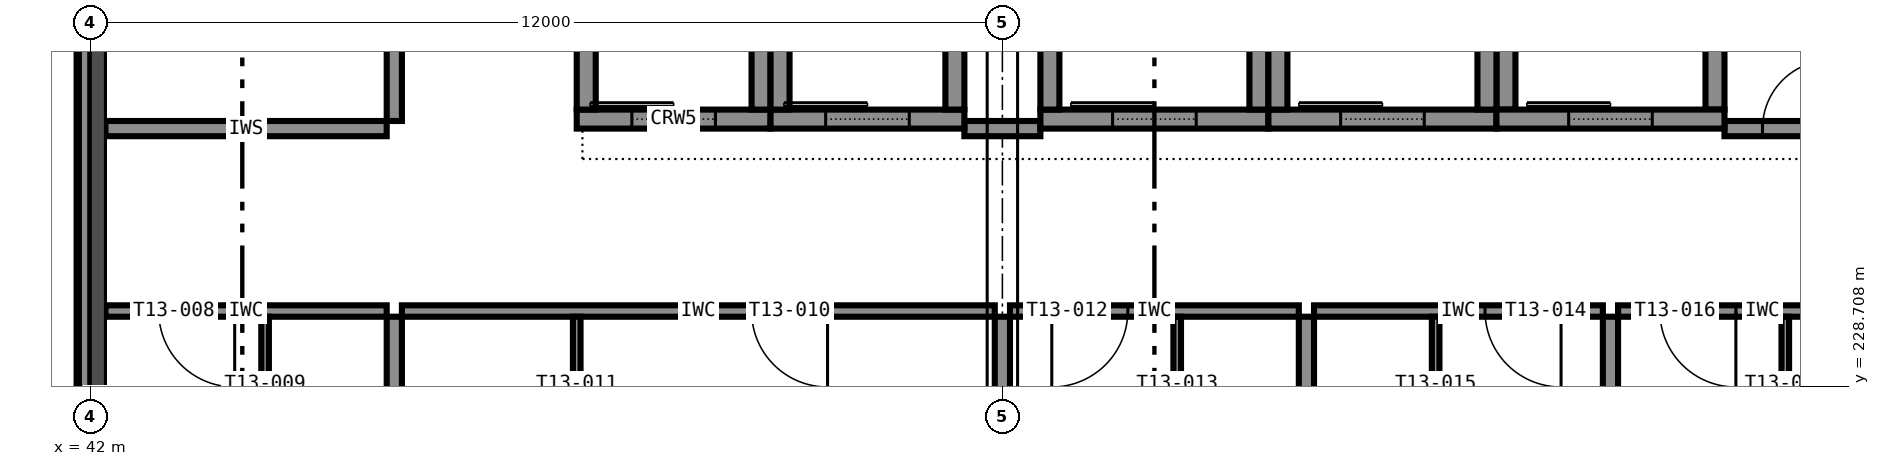
"""IFC4 building model, lengths in metres.
Left out: names, types, materials, properties, quantities, classifications, styles, units other than length and angle.
Written with IfcOpenShell. Run it as: python <this file> out.ifc"""

import sys

from ifc_helpers import new_model, si_unit, direction, frame, frame_2d, origin, place, context, subcontext, project, spatial, rectangle, extrude, element, fill, save


model = new_model("IFC4")
c1 = context("Model", 3, precision=1e-05, world=origin(), true_north=direction((0.0, 1.0)))
c2 = subcontext(c1, "Body", "Model", "MODEL_VIEW")
j1 = project(units=[si_unit("LENGTHUNIT", "METRE"), si_unit("PLANEANGLEUNIT", "RADIAN")], contexts=[c1])
p1 = place(None, origin())
s1 = spatial("IfcSite", under=j1, at=p1, CompositionType="ELEMENT")
p2 = place(p1, origin())
s2 = spatial("IfcBuilding", under=s1, at=p2, CompositionType="ELEMENT")
p3 = place(p2, frame((0.0, 0.0, 53.4)))
s3 = spatial("IfcBuildingStorey", under=s2, at=p3, CompositionType="ELEMENT", Elevation=53.4)
p4 = place(p3, frame((54.5, 232.225, 0.0), z_axis=(0.0, 0.0, 1.0), x_axis=(1.0, 0.0, 0.0)))
e1 = element("IfcWall", 1, at=p4, inside=s3, PredefinedType="SHEAR", context=c2, shape_type="SweptSolid", body=[
    extrude(rectangle(XDim=3.0, YDim=0.25, at=frame_2d((1.5, 0.0))), origin(), (0.0, 0.0, 1.0), 3.6),
])
p5 = place(p4, frame((0.95, 0.0, 0.0)))
e2 = element("IfcOpeningElement", 2, at=p5, cuts=e1, PredefinedType="OPENING", context=c2, shape_type="SweptSolid", body=[
    extrude(rectangle(XDim=1.1, YDim=2.1, at=frame_2d((0.55, 1.05))), frame((0.0, 0.135, 0.0), z_axis=(0.0, -1.0, 0.0), x_axis=(1.0, 0.0, 0.0)), (0.0, 0.0, 1.0), 0.27),
])
for number, where, z_axis, x_axis in (
    (3, (54.625, 232.35, 0.0), (0.0, 0.0, 1.0), (0.0, 1.0, 0.0)),
    (4, (57.375, 232.35, 0.0), (0.0, 0.0, 1.0), (0.0, 1.0, 0.0)),
):
    element("IfcWall", number, at=place(p3, frame(where, z_axis=z_axis, x_axis=x_axis)), inside=s3, PredefinedType="SHEAR", context=c2, shape_type="SweptSolid", body=[
        extrude(rectangle(XDim=3.3, YDim=0.25, at=frame_2d((1.65, 0.0))), origin(), (0.0, 0.0, 1.0), 3.6),
    ])
p6 = place(p3, frame((57.5, 232.225, 0.0), z_axis=(0.0, 0.0, 1.0), x_axis=(1.0, 0.0, 0.0)))
e5 = element("IfcWall", 5, at=p6, inside=s3, PredefinedType="SHEAR", context=c2, shape_type="SweptSolid", body=[
    extrude(rectangle(XDim=3.0, YDim=0.25, at=frame_2d((1.5, 0.0))), origin(), (0.0, 0.0, 1.0), 3.6),
])
p7 = place(p6, frame((0.95, 0.0, 0.0)))
e6 = element("IfcOpeningElement", 6, at=p7, cuts=e5, PredefinedType="OPENING", context=c2, shape_type="SweptSolid", body=[
    extrude(rectangle(XDim=1.1, YDim=2.1, at=frame_2d((0.55, 1.05))), frame((0.0, 0.135, 0.0), z_axis=(0.0, -1.0, 0.0), x_axis=(1.0, 0.0, 0.0)), (0.0, 0.0, 1.0), 0.27),
])
for number, where, z_axis, x_axis in (
    (7, (57.625, 232.35, 0.0), (0.0, 0.0, 1.0), (0.0, 1.0, 0.0)),
    (8, (60.375, 232.35, 0.0), (0.0, 0.0, 1.0), (0.0, 1.0, 0.0)),
):
    element("IfcWall", number, at=place(p3, frame(where, z_axis=z_axis, x_axis=x_axis)), inside=s3, PredefinedType="SHEAR", context=c2, shape_type="SweptSolid", body=[
        extrude(rectangle(XDim=3.3, YDim=0.25, at=frame_2d((1.65, 0.0))), origin(), (0.0, 0.0, 1.0), 3.6),
    ])
p8 = place(p3, frame((60.5, 232.225, 0.0), z_axis=(0.0, 0.0, 1.0), x_axis=(1.0, 0.0, 0.0)))
e9 = element("IfcWall", 9, at=p8, inside=s3, PredefinedType="SHEAR", context=c2, shape_type="SweptSolid", body=[
    extrude(rectangle(XDim=3.0, YDim=0.25, at=frame_2d((1.5, 0.0))), origin(), (0.0, 0.0, 1.0), 3.6),
])
p9 = place(p8, frame((0.95, 0.0, 0.0)))
e10 = element("IfcOpeningElement", 10, at=p9, cuts=e9, PredefinedType="OPENING", context=c2, shape_type="SweptSolid", body=[
    extrude(rectangle(XDim=1.1, YDim=2.1, at=frame_2d((0.55, 1.05))), frame((0.0, 0.135, 0.0), z_axis=(0.0, -1.0, 0.0), x_axis=(1.0, 0.0, 0.0)), (0.0, 0.0, 1.0), 0.27),
])
for number, where, z_axis, x_axis in (
    (11, (60.625, 232.35, 0.0), (0.0, 0.0, 1.0), (0.0, 1.0, 0.0)),
    (12, (63.375, 232.35, 0.0), (0.0, 0.0, 1.0), (0.0, 1.0, 0.0)),
):
    element("IfcWall", number, at=place(p3, frame(where, z_axis=z_axis, x_axis=x_axis)), inside=s3, PredefinedType="SHEAR", context=c2, shape_type="SweptSolid", body=[
        extrude(rectangle(XDim=3.3, YDim=0.25, at=frame_2d((1.65, 0.0))), origin(), (0.0, 0.0, 1.0), 3.6),
    ])
p10 = place(p3, frame((48.4, 232.225, 0.0), z_axis=(0.0, 0.0, 1.0), x_axis=(1.0, 0.0, 0.0)))
e13 = element("IfcWall", 13, at=p10, inside=s3, PredefinedType="SHEAR", context=c2, shape_type="SweptSolid", body=[
    extrude(rectangle(XDim=2.55, YDim=0.25, at=frame_2d((1.275, 0.0))), origin(), (0.0, 0.0, 1.0), 3.6),
])
p11 = place(p10, frame((0.725, 0.0, 0.0)))
e14 = element("IfcOpeningElement", 14, at=p11, cuts=e13, PredefinedType="OPENING", context=c2, shape_type="SweptSolid", body=[
    extrude(rectangle(XDim=1.1, YDim=2.1, at=frame_2d((0.55, 1.05))), frame((0.0, 0.135, 0.0), z_axis=(0.0, -1.0, 0.0), x_axis=(1.0, 0.0, 0.0)), (0.0, 0.0, 1.0), 0.27),
])
for number, where, z_axis, x_axis in (
    (15, (48.525, 232.35, 0.0), (0.0, 0.0, 1.0), (0.0, 1.0, 0.0)),
    (16, (50.825, 232.35, 0.0), (0.0, 0.0, 1.0), (0.0, 1.0, 0.0)),
):
    element("IfcWall", number, at=place(p3, frame(where, z_axis=z_axis, x_axis=x_axis)), inside=s3, PredefinedType="SHEAR", context=c2, shape_type="SweptSolid", body=[
        extrude(rectangle(XDim=3.3, YDim=0.25, at=frame_2d((1.65, 0.0))), origin(), (0.0, 0.0, 1.0), 3.6),
    ])
p12 = place(p3, frame((50.95, 232.225, 0.0), z_axis=(0.0, 0.0, 1.0), x_axis=(1.0, 0.0, 0.0)))
e17 = element("IfcWall", 17, at=p12, inside=s3, PredefinedType="SHEAR", context=c2, shape_type="SweptSolid", body=[
    extrude(rectangle(XDim=2.55, YDim=0.25, at=frame_2d((1.275, 0.0))), origin(), (0.0, 0.0, 1.0), 3.6),
])
p13 = place(p12, frame((0.725, 0.0, 0.0)))
e18 = element("IfcOpeningElement", 18, at=p13, cuts=e17, PredefinedType="OPENING", context=c2, shape_type="SweptSolid", body=[
    extrude(rectangle(XDim=1.1, YDim=2.1, at=frame_2d((0.55, 1.05))), frame((0.0, 0.135, 0.0), z_axis=(0.0, -1.0, 0.0), x_axis=(1.0, 0.0, 0.0)), (0.0, 0.0, 1.0), 0.27),
])
for number, where, z_axis, x_axis in (
    (19, (51.075, 232.35, 0.0), (0.0, 0.0, 1.0), (0.0, 1.0, 0.0)),
    (20, (53.375, 232.35, 0.0), (0.0, 0.0, 1.0), (0.0, 1.0, 0.0)),
):
    element("IfcWall", number, at=place(p3, frame(where, z_axis=z_axis, x_axis=x_axis)), inside=s3, PredefinedType="SHEAR", context=c2, shape_type="SweptSolid", body=[
        extrude(rectangle(XDim=3.3, YDim=0.25, at=frame_2d((1.65, 0.0))), origin(), (0.0, 0.0, 1.0), 3.6),
    ])
p14 = place(p3, frame((41.925, 233.65, 3.4), z_axis=(0.0, 0.0, 1.0), x_axis=(0.0, -1.0, 0.0)))
e21 = element("IfcWall", 21, at=p14, inside=s3, PredefinedType="STANDARD", context=c2, shape_type="SweptSolid", body=[
    extrude(rectangle(XDim=11.3, YDim=0.15, at=frame_2d((5.65, 0.0))), origin(), (0.0, 0.0, 1.0), 0.2),
])
p15 = place(p3, frame((42.2, 232.1, 0.0), z_axis=(0.0, 0.0, 1.0), x_axis=(1.0, 0.0, 0.0)))
e22 = element("IfcWall", 22, at=p15, inside=s3, PredefinedType="PARTITIONING", context=c2, shape_type="SweptSolid", body=[
    extrude(rectangle(XDim=3.7, YDim=0.2, at=frame_2d((1.85, 0.0))), origin(), (0.0, 0.0, 1.0), 3.4),
])
p16 = place(p3, frame((53.5, 232.1, 0.0), z_axis=(0.0, 0.0, 1.0), x_axis=(1.0, 0.0, 0.0)))
e23 = element("IfcWall", 23, at=p16, inside=s3, PredefinedType="PARTITIONING", context=c2, shape_type="SweptSolid", body=[
    extrude(rectangle(XDim=1.0, YDim=0.2, at=frame_2d((0.5, 0.0))), origin(), (0.0, 0.0, 1.0), 3.4),
])
p17 = place(p3, frame((63.5, 232.1, 0.0), z_axis=(0.0, 0.0, 1.0), x_axis=(1.0, 0.0, 0.0)))
e24 = element("IfcWall", 24, at=p17, inside=s3, PredefinedType="PARTITIONING", context=c2, shape_type="SweptSolid", body=[
    extrude(rectangle(XDim=1.9, YDim=0.2, at=frame_2d((0.95, 0.0))), origin(), (0.0, 0.0, 1.0), 3.4),
])
p18 = place(p17, frame((0.5, 0.0, 0.0)))
e25 = element("IfcOpeningElement", 25, at=p18, cuts=e24, PredefinedType="OPENING", context=c2, shape_type="SweptSolid", body=[
    extrude(rectangle(XDim=0.9, YDim=2.1, at=frame_2d((0.45, 1.05))), frame((0.0, 0.11, 0.0), z_axis=(0.0, -1.0, 0.0), x_axis=(1.0, 0.0, 0.0)), (0.0, 0.0, 1.0), 0.22),
])
p19 = place(p3, frame((46.0, 232.2, 0.0), z_axis=(0.0, 0.0, 1.0), x_axis=(0.0, 1.0, 0.0)))
e26 = element("IfcWall", 26, at=p19, inside=s3, PredefinedType="PARTITIONING", context=c2, shape_type="SweptSolid", body=[
    extrude(rectangle(XDim=3.6, YDim=0.2, at=frame_2d((1.8, 0.0))), origin(), (0.0, 0.0, 1.0), 3.4),
])
p20 = place(p19, frame((1.35, 0.0, 0.0)))
e27 = element("IfcOpeningElement", 27, at=p20, cuts=e26, PredefinedType="OPENING", context=c2, shape_type="SweptSolid", body=[
    extrude(rectangle(XDim=0.9, YDim=2.1, at=frame_2d((0.45, 1.05))), frame((0.0, 0.11, 0.0), z_axis=(0.0, -1.0, 0.0), x_axis=(1.0, 0.0, 0.0)), (0.0, 0.0, 1.0), 0.22),
])
p21 = place(p3, frame((45.9, 229.7, 0.0), z_axis=(0.0, 0.0, 1.0), x_axis=(-1.0, 0.0, 0.0)))
e28 = element("IfcWall", 28, at=p21, inside=s3, PredefinedType="PARTITIONING", context=c2, shape_type="SweptSolid", body=[
    extrude(rectangle(XDim=3.7, YDim=0.15, at=frame_2d((1.85, 0.0))), origin(), (0.0, 0.0, 1.0), 3.4),
])
p22 = place(p21, frame((2.0, 0.0, 0.0)))
e29 = element("IfcOpeningElement", 29, at=p22, cuts=e28, PredefinedType="OPENING", context=c2, shape_type="SweptSolid", body=[
    extrude(rectangle(XDim=1.0, YDim=2.1, at=frame_2d((0.5, 1.05))), frame((0.0, 0.085, 0.0), z_axis=(0.0, -1.0, 0.0), x_axis=(1.0, 0.0, 0.0)), (0.0, 0.0, 1.0), 0.17),
])
p23 = place(p3, frame((44.3, 226.75, 0.0), z_axis=(0.0, 0.0, 1.0), x_axis=(0.0, 1.0, 0.0)))
e30 = element("IfcWall", 30, at=p23, inside=s3, PredefinedType="PARTITIONING", context=c2, shape_type="SweptSolid", body=[
    extrude(rectangle(XDim=2.875, YDim=0.1, at=frame_2d((1.438, 0.0))), origin(), (0.0, 0.0, 1.0), 3.4),
])
p24 = place(p23, frame((1.038, 0.0, 0.0)))
e31 = element("IfcOpeningElement", 31, at=p24, cuts=e30, PredefinedType="OPENING", context=c2, shape_type="SweptSolid", body=[
    extrude(rectangle(XDim=0.8, YDim=2.1, at=frame_2d((0.4, 1.05))), frame((0.0, 0.06, 0.0), z_axis=(0.0, -1.0, 0.0), x_axis=(1.0, 0.0, 0.0)), (0.0, 0.0, 1.0), 0.12),
])
p25 = place(p3, frame((53.9, 229.7, 0.0), z_axis=(0.0, 0.0, 1.0), x_axis=(-1.0, 0.0, 0.0)))
e32 = element("IfcWall", 32, at=p25, inside=s3, PredefinedType="PARTITIONING", context=c2, shape_type="SweptSolid", body=[
    extrude(rectangle(XDim=7.8, YDim=0.15, at=frame_2d((3.9, 0.0))), origin(), (0.0, 0.0, 1.0), 3.4),
])
p26 = place(p25, frame((2.2, 0.0, 0.0)))
e33 = element("IfcOpeningElement", 33, at=p26, cuts=e32, PredefinedType="OPENING", context=c2, shape_type="SweptSolid", body=[
    extrude(rectangle(XDim=1.0, YDim=2.1, at=frame_2d((0.5, 1.05))), frame((0.0, 0.085, 0.0), z_axis=(0.0, -1.0, 0.0), x_axis=(1.0, 0.0, 0.0)), (0.0, 0.0, 1.0), 0.17),
])
p27 = place(p3, frame((48.4, 229.625, 0.0), z_axis=(0.0, 0.0, 1.0), x_axis=(0.0, -1.0, 0.0)))
e34 = element("IfcWall", 34, at=p27, inside=s3, PredefinedType="PARTITIONING", context=c2, shape_type="SweptSolid", body=[
    extrude(rectangle(XDim=2.875, YDim=0.1, at=frame_2d((1.438, 0.0))), origin(), (0.0, 0.0, 1.0), 3.4),
])
p28 = place(p27, frame((1.038, 0.0, 0.0)))
e35 = element("IfcOpeningElement", 35, at=p28, cuts=e34, PredefinedType="OPENING", context=c2, shape_type="SweptSolid", body=[
    extrude(rectangle(XDim=0.8, YDim=2.1, at=frame_2d((0.4, 1.05))), frame((0.0, 0.06, 0.0), z_axis=(0.0, -1.0, 0.0), x_axis=(1.0, 0.0, 0.0)), (0.0, 0.0, 1.0), 0.12),
])
p29 = place(p3, frame((57.9, 229.7, 0.0), z_axis=(0.0, 0.0, 1.0), x_axis=(-1.0, 0.0, 0.0)))
e36 = element("IfcWall", 36, at=p29, inside=s3, PredefinedType="PARTITIONING", context=c2, shape_type="SweptSolid", body=[
    extrude(rectangle(XDim=3.8, YDim=0.15, at=frame_2d((1.9, 0.0))), origin(), (0.0, 0.0, 1.0), 3.4),
])
p30 = place(p29, frame((2.25, 0.0, 0.0)))
e37 = element("IfcOpeningElement", 37, at=p30, cuts=e36, PredefinedType="OPENING", context=c2, shape_type="SweptSolid", body=[
    extrude(rectangle(XDim=1.0, YDim=2.1, at=frame_2d((0.5, 1.05))), frame((0.0, 0.085, 0.0), z_axis=(0.0, -1.0, 0.0), x_axis=(1.0, 0.0, 0.0)), (0.0, 0.0, 1.0), 0.17),
])
p31 = place(p3, frame((56.3, 226.75, 0.0), z_axis=(0.0, 0.0, 1.0), x_axis=(0.0, 1.0, 0.0)))
e38 = element("IfcWall", 38, at=p31, inside=s3, PredefinedType="PARTITIONING", context=c2, shape_type="SweptSolid", body=[
    extrude(rectangle(XDim=2.875, YDim=0.1, at=frame_2d((1.438, 0.0))), origin(), (0.0, 0.0, 1.0), 3.4),
])
p32 = place(p31, frame((1.038, 0.0, 0.0)))
e39 = element("IfcOpeningElement", 39, at=p32, cuts=e38, PredefinedType="OPENING", context=c2, shape_type="SweptSolid", body=[
    extrude(rectangle(XDim=0.8, YDim=2.1, at=frame_2d((0.4, 1.05))), frame((0.0, 0.06, 0.0), z_axis=(0.0, -1.0, 0.0), x_axis=(1.0, 0.0, 0.0)), (0.0, 0.0, 1.0), 0.12),
])
p33 = place(p3, frame((61.9, 229.7, 0.0), z_axis=(0.0, 0.0, 1.0), x_axis=(-1.0, 0.0, 0.0)))
e40 = element("IfcWall", 40, at=p33, inside=s3, PredefinedType="PARTITIONING", context=c2, shape_type="SweptSolid", body=[
    extrude(rectangle(XDim=3.8, YDim=0.15, at=frame_2d((1.9, 0.0))), origin(), (0.0, 0.0, 1.0), 3.4),
])
p34 = place(p33, frame((0.55, 0.0, 0.0)))
e41 = element("IfcOpeningElement", 41, at=p34, cuts=e40, PredefinedType="OPENING", context=c2, shape_type="SweptSolid", body=[
    extrude(rectangle(XDim=1.0, YDim=2.1, at=frame_2d((0.5, 1.05))), frame((0.0, 0.085, 0.0), z_axis=(0.0, -1.0, 0.0), x_axis=(1.0, 0.0, 0.0)), (0.0, 0.0, 1.0), 0.17),
])
p35 = place(p3, frame((59.7, 229.625, 0.0), z_axis=(0.0, 0.0, 1.0), x_axis=(0.0, -1.0, 0.0)))
e42 = element("IfcWall", 42, at=p35, inside=s3, PredefinedType="PARTITIONING", context=c2, shape_type="SweptSolid", body=[
    extrude(rectangle(XDim=2.875, YDim=0.1, at=frame_2d((1.438, 0.0))), origin(), (0.0, 0.0, 1.0), 3.4),
])
p36 = place(p35, frame((1.038, 0.0, 0.0)))
e43 = element("IfcOpeningElement", 43, at=p36, cuts=e42, PredefinedType="OPENING", context=c2, shape_type="SweptSolid", body=[
    extrude(rectangle(XDim=0.8, YDim=2.1, at=frame_2d((0.4, 1.05))), frame((0.0, 0.06, 0.0), z_axis=(0.0, -1.0, 0.0), x_axis=(1.0, 0.0, 0.0)), (0.0, 0.0, 1.0), 0.12),
])
p37 = place(p3, frame((65.9, 229.7, 0.0), z_axis=(0.0, 0.0, 1.0), x_axis=(-1.0, 0.0, 0.0)))
e44 = element("IfcWall", 44, at=p37, inside=s3, PredefinedType="PARTITIONING", context=c2, shape_type="SweptSolid", body=[
    extrude(rectangle(XDim=3.8, YDim=0.15, at=frame_2d((1.9, 0.0))), origin(), (0.0, 0.0, 1.0), 3.4),
])
p38 = place(p37, frame((2.25, 0.0, 0.0)))
e45 = element("IfcOpeningElement", 45, at=p38, cuts=e44, PredefinedType="OPENING", context=c2, shape_type="SweptSolid", body=[
    extrude(rectangle(XDim=1.0, YDim=2.1, at=frame_2d((0.5, 1.05))), frame((0.0, 0.085, 0.0), z_axis=(0.0, -1.0, 0.0), x_axis=(1.0, 0.0, 0.0)), (0.0, 0.0, 1.0), 0.17),
])
p39 = place(p3, frame((64.3, 226.75, 0.0), z_axis=(0.0, 0.0, 1.0), x_axis=(0.0, 1.0, 0.0)))
e46 = element("IfcWall", 46, at=p39, inside=s3, PredefinedType="PARTITIONING", context=c2, shape_type="SweptSolid", body=[
    extrude(rectangle(XDim=2.875, YDim=0.1, at=frame_2d((1.438, 0.0))), origin(), (0.0, 0.0, 1.0), 3.4),
])
p40 = place(p39, frame((1.038, 0.0, 0.0)))
e47 = element("IfcOpeningElement", 47, at=p40, cuts=e46, PredefinedType="OPENING", context=c2, shape_type="SweptSolid", body=[
    extrude(rectangle(XDim=0.8, YDim=2.1, at=frame_2d((0.4, 1.05))), frame((0.0, 0.06, 0.0), z_axis=(0.0, -1.0, 0.0), x_axis=(1.0, 0.0, 0.0)), (0.0, 0.0, 1.0), 0.12),
])
p41 = place(p3, frame((46.0, 222.3, 0.0), z_axis=(0.0, 0.0, 1.0), x_axis=(0.0, 1.0, 0.0)))
e48 = element("IfcWall", 48, at=p41, inside=s3, PredefinedType="PARTITIONING", context=c2, shape_type="SweptSolid", body=[
    extrude(rectangle(XDim=7.325, YDim=0.2, at=frame_2d((3.663, 0.0))), origin(), (0.0, 0.0, 1.0), 3.4),
])
p42 = place(p3, frame((54.0, 222.35, 0.0), z_axis=(0.0, 0.0, 1.0), x_axis=(0.0, 1.0, 0.0)))
e49 = element("IfcWall", 49, at=p42, inside=s3, PredefinedType="PARTITIONING", context=c2, shape_type="SweptSolid", body=[
    extrude(rectangle(XDim=7.275, YDim=0.2, at=frame_2d((3.637, 0.0))), origin(), (0.0, 0.0, 1.0), 2.6),
])
for number, where, z_axis, x_axis in (
    (50, (58.0, 222.3, 0.0), (0.0, 0.0, 1.0), (0.0, 1.0, 0.0)),
    (51, (62.0, 222.3, 0.0), (0.0, 0.0, 1.0), (0.0, 1.0, 0.0)),
):
    element("IfcWall", number, at=place(p3, frame(where, z_axis=z_axis, x_axis=x_axis)), inside=s3, PredefinedType="PARTITIONING", context=c2, shape_type="SweptSolid", body=[
        extrude(rectangle(XDim=7.325, YDim=0.2, at=frame_2d((3.663, 0.0))), origin(), (0.0, 0.0, 1.0), 3.4),
    ])
p43 = place(p18, origin())
e52 = element("IfcDoor", 52, at=p43, inside=s3, OperationType="SINGLE_SWING_RIGHT", PredefinedType="DOOR", context=c2, shape_type="SweptSolid", body=[
    extrude(rectangle(XDim=0.9, YDim=2.1, at=frame_2d((0.45, 1.05))), frame((0.0, 0.025, 0.0), z_axis=(0.0, -1.0, 0.0), x_axis=(1.0, 0.0, 0.0)), (0.0, 0.0, 1.0), 0.05),
])
fill(e25, e52)
p44 = place(p22, origin())
e53 = element("IfcDoor", 53, at=p44, inside=s3, OperationType="SINGLE_SWING_LEFT", PredefinedType="DOOR", context=c2, shape_type="SweptSolid", body=[
    extrude(rectangle(XDim=1.0, YDim=2.1, at=frame_2d((0.5, 1.05))), frame((0.0, 0.025, 0.0), z_axis=(0.0, -1.0, 0.0), x_axis=(1.0, 0.0, 0.0)), (0.0, 0.0, 1.0), 0.05),
])
fill(e29, e53)
p45 = place(p26, origin())
e54 = element("IfcDoor", 54, at=p45, inside=s3, OperationType="SINGLE_SWING_LEFT", PredefinedType="DOOR", context=c2, shape_type="SweptSolid", body=[
    extrude(rectangle(XDim=1.0, YDim=2.1, at=frame_2d((0.5, 1.05))), frame((0.0, 0.025, 0.0), z_axis=(0.0, -1.0, 0.0), x_axis=(1.0, 0.0, 0.0)), (0.0, 0.0, 1.0), 0.05),
])
fill(e33, e54)
p46 = place(p30, origin())
e55 = element("IfcDoor", 55, at=p46, inside=s3, OperationType="SINGLE_SWING_RIGHT", PredefinedType="DOOR", context=c2, shape_type="SweptSolid", body=[
    extrude(rectangle(XDim=1.0, YDim=2.1, at=frame_2d((0.5, 1.05))), frame((0.0, 0.025, 0.0), z_axis=(0.0, -1.0, 0.0), x_axis=(1.0, 0.0, 0.0)), (0.0, 0.0, 1.0), 0.05),
])
fill(e37, e55)
p47 = place(p34, origin())
e56 = element("IfcDoor", 56, at=p47, inside=s3, OperationType="SINGLE_SWING_LEFT", PredefinedType="DOOR", context=c2, shape_type="SweptSolid", body=[
    extrude(rectangle(XDim=1.0, YDim=2.1, at=frame_2d((0.5, 1.05))), frame((0.0, 0.025, 0.0), z_axis=(0.0, -1.0, 0.0), x_axis=(1.0, 0.0, 0.0)), (0.0, 0.0, 1.0), 0.05),
])
fill(e41, e56)
p48 = place(p38, origin())
e57 = element("IfcDoor", 57, at=p48, inside=s3, OperationType="SINGLE_SWING_LEFT", PredefinedType="DOOR", context=c2, shape_type="SweptSolid", body=[
    extrude(rectangle(XDim=1.0, YDim=2.1, at=frame_2d((0.5, 1.05))), frame((0.0, 0.025, 0.0), z_axis=(0.0, -1.0, 0.0), x_axis=(1.0, 0.0, 0.0)), (0.0, 0.0, 1.0), 0.05),
])
fill(e45, e57)
p49 = place(p5, origin())
e58 = element("IfcDoor", 58, at=p49, inside=s3, OperationType="SLIDING_TO_LEFT", PredefinedType="DOOR", context=c2, shape_type="SweptSolid", body=[
    extrude(rectangle(XDim=1.1, YDim=2.1, at=frame_2d((0.55, 1.05))), frame((0.0, 0.025, 0.0), z_axis=(0.0, -1.0, 0.0), x_axis=(1.0, 0.0, 0.0)), (0.0, 0.0, 1.0), 0.05),
])
fill(e2, e58)
p50 = place(p7, origin())
e59 = element("IfcDoor", 59, at=p50, inside=s3, OperationType="SLIDING_TO_LEFT", PredefinedType="DOOR", context=c2, shape_type="SweptSolid", body=[
    extrude(rectangle(XDim=1.1, YDim=2.1, at=frame_2d((0.55, 1.05))), frame((0.0, 0.025, 0.0), z_axis=(0.0, -1.0, 0.0), x_axis=(1.0, 0.0, 0.0)), (0.0, 0.0, 1.0), 0.05),
])
fill(e6, e59)
p51 = place(p9, origin())
e60 = element("IfcDoor", 60, at=p51, inside=s3, OperationType="SLIDING_TO_LEFT", PredefinedType="DOOR", context=c2, shape_type="SweptSolid", body=[
    extrude(rectangle(XDim=1.1, YDim=2.1, at=frame_2d((0.55, 1.05))), frame((0.0, 0.025, 0.0), z_axis=(0.0, -1.0, 0.0), x_axis=(1.0, 0.0, 0.0)), (0.0, 0.0, 1.0), 0.05),
])
fill(e10, e60)
p52 = place(p11, origin())
e61 = element("IfcDoor", 61, at=p52, inside=s3, OperationType="SLIDING_TO_LEFT", PredefinedType="DOOR", context=c2, shape_type="SweptSolid", body=[
    extrude(rectangle(XDim=1.1, YDim=2.1, at=frame_2d((0.55, 1.05))), frame((0.0, 0.025, 0.0), z_axis=(0.0, -1.0, 0.0), x_axis=(1.0, 0.0, 0.0)), (0.0, 0.0, 1.0), 0.05),
])
fill(e14, e61)
p53 = place(p13, origin())
e62 = element("IfcDoor", 62, at=p53, inside=s3, OperationType="SLIDING_TO_LEFT", PredefinedType="DOOR", context=c2, shape_type="SweptSolid", body=[
    extrude(rectangle(XDim=1.1, YDim=2.1, at=frame_2d((0.55, 1.05))), frame((0.0, 0.025, 0.0), z_axis=(0.0, -1.0, 0.0), x_axis=(1.0, 0.0, 0.0)), (0.0, 0.0, 1.0), 0.05),
])
fill(e18, e62)
save(model, sys.argv[1])
